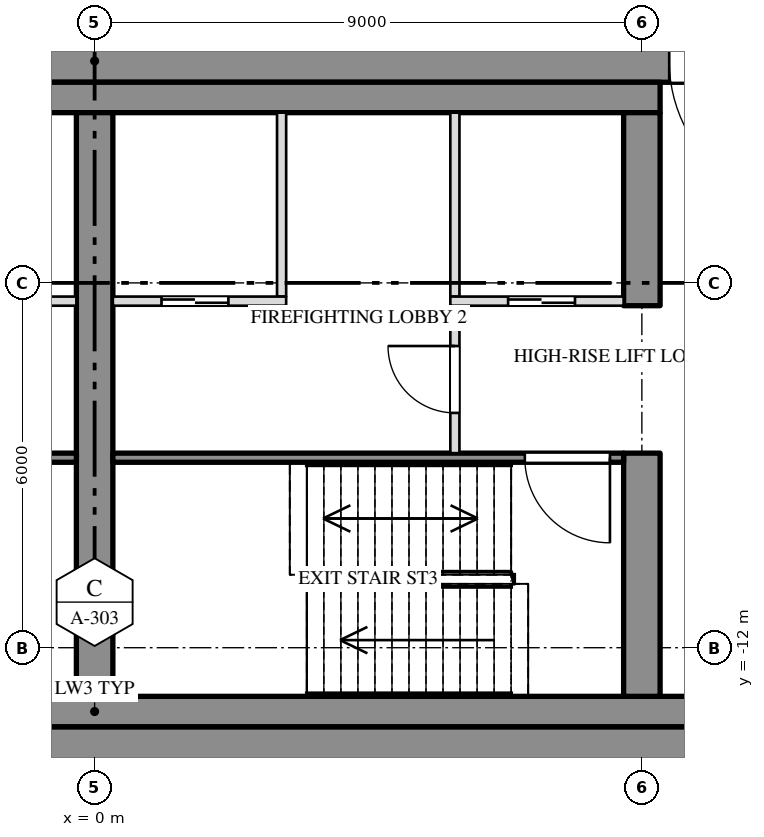
"""IFC4 building model, lengths in metres.
Left out: names, types, materials, properties, quantities, classifications, styles, units other than length and angle.
Written with IfcOpenShell. Run it as: python <this file> out.ifc"""

import sys

from ifc_helpers import new_model, si_unit, direction, frame, frame_2d, origin, place, context, subcontext, project, spatial, rectangle, extrude, element, fill, save


model = new_model("IFC4")
c1 = context("Model", 3, precision=1e-05, world=origin(), true_north=direction((0.0, 1.0)))
c2 = subcontext(c1, "Body", "Model", "MODEL_VIEW")
j1 = project(units=[si_unit("LENGTHUNIT", "METRE"), si_unit("PLANEANGLEUNIT", "RADIAN")], contexts=[c1])
p1 = place(None, origin())
s1 = spatial("IfcSite", under=j1, at=p1, CompositionType="ELEMENT")
p2 = place(p1, origin())
s2 = spatial("IfcBuilding", under=s1, at=p2, CompositionType="ELEMENT")
p3 = place(p2, frame((0.0, 0.0, 256.5)))
s3 = spatial("IfcBuildingStorey", under=s2, at=p3, CompositionType="ELEMENT", Elevation=256.5)
p4 = place(p3, frame((-27.0, -2.35, 0.0), z_axis=(0.0, 0.0, 1.0), x_axis=(1.0, 0.0, 0.0)))
e1 = element("IfcWall", 1, at=p4, inside=s3, PredefinedType="SHEAR", context=c2, shape_type="SweptSolid", body=[
    extrude(rectangle(XDim=54.0, YDim=0.7, at=frame_2d((27.0, 0.0))), origin(), (0.0, 0.0, 1.0), 3.8),
])
p5 = place(p4, frame((15.15, 0.0, 0.0)))
e2 = element("IfcOpeningElement", 2, at=p5, cuts=e1, PredefinedType="OPENING", context=c2, shape_type="SweptSolid", body=[
    extrude(rectangle(XDim=2.4, YDim=2.1, at=frame_2d((1.2, 1.05))), frame((0.0, 0.362, 0.0), z_axis=(0.0, -1.0, 0.0), x_axis=(1.0, 0.0, 0.0)), (0.0, 0.0, 1.0), 0.724),
])
p6 = place(p4, frame((36.45, 0.0, 0.0)))
e3 = element("IfcOpeningElement", 3, at=p6, cuts=e1, PredefinedType="OPENING", context=c2, shape_type="SweptSolid", body=[
    extrude(rectangle(XDim=2.4, YDim=2.1, at=frame_2d((1.2, 1.05))), frame((0.0, 0.362, 0.0), z_axis=(0.0, -1.0, 0.0), x_axis=(1.0, 0.0, 0.0)), (0.0, 0.0, 1.0), 0.724),
])
p7 = place(p3, frame((-27.0, -13.65, 0.0), z_axis=(0.0, 0.0, 1.0), x_axis=(1.0, 0.0, 0.0)))
e4 = element("IfcWall", 4, at=p7, inside=s3, PredefinedType="SHEAR", context=c2, shape_type="SweptSolid", body=[
    extrude(rectangle(XDim=54.0, YDim=0.7, at=frame_2d((27.0, 0.0))), origin(), (0.0, 0.0, 1.0), 3.8),
])
p8 = place(p3, frame((-9.3, -2.95, 0.0), z_axis=(0.0, 0.0, 1.0), x_axis=(1.0, 0.0, 0.0)))
e5 = element("IfcWall", 5, at=p8, inside=s3, PredefinedType="SHEAR", context=c2, shape_type="SweptSolid", body=[
    extrude(rectangle(XDim=18.6, YDim=0.5, at=frame_2d((9.3, 0.0))), origin(), (0.0, 0.0, 1.0), 3.8),
])
p9 = place(p3, frame((-26.3, -13.05, 0.0), z_axis=(0.0, 0.0, 1.0), x_axis=(1.0, 0.0, 0.0)))
e6 = element("IfcWall", 6, at=p9, inside=s3, PredefinedType="SHEAR", context=c2, shape_type="SweptSolid", body=[
    extrude(rectangle(XDim=52.6, YDim=0.5, at=frame_2d((26.3, 0.0))), origin(), (0.0, 0.0, 1.0), 3.8),
])
p10 = place(p3, frame((0.0, -12.8, 0.0), z_axis=(0.0, 0.0, 1.0), x_axis=(0.0, 1.0, 0.0)))
e7 = element("IfcWall", 7, at=p10, inside=s3, PredefinedType="SHEAR", context=c2, shape_type="SweptSolid", body=[
    extrude(rectangle(XDim=9.6, YDim=0.6, at=frame_2d((4.8, 0.0))), origin(), (0.0, 0.0, 1.0), 3.8),
])
p11 = place(p3, frame((9.0, -12.8, 0.0), z_axis=(0.0, 0.0, 1.0), x_axis=(0.0, 1.0, 0.0)))
e8 = element("IfcWall", 8, at=p11, inside=s3, PredefinedType="SHEAR", context=c2, shape_type="SweptSolid", body=[
    extrude(rectangle(XDim=4.0, YDim=0.6, at=frame_2d((2.0, 0.0))), origin(), (0.0, 0.0, 1.0), 3.8),
])
p12 = place(p3, frame((9.0, -6.375, 0.0), z_axis=(0.0, 0.0, 1.0), x_axis=(0.0, 1.0, 0.0)))
e9 = element("IfcWall", 9, at=p12, inside=s3, PredefinedType="SHEAR", context=c2, shape_type="SweptSolid", body=[
    extrude(rectangle(XDim=3.175, YDim=0.6, at=frame_2d((1.587, 0.0))), origin(), (0.0, 0.0, 1.0), 3.8),
])
for number, where, z_axis, x_axis in (
    (10, (3.075, -6.225, 0.0), (0.0, 0.0, 1.0), (0.0, 1.0, 0.0)),
    (11, (5.925, -6.225, 0.0), (0.0, 0.0, 1.0), (0.0, 1.0, 0.0)),
):
    element("IfcWall", number, at=place(p3, frame(where, z_axis=z_axis, x_axis=x_axis)), inside=s3, PredefinedType="PARTITIONING", context=c2, shape_type="SweptSolid", body=[
        extrude(rectangle(XDim=3.025, YDim=0.15, at=frame_2d((1.513, 0.0))), origin(), (0.0, 0.0, 1.0), 3.8),
    ])
p13 = place(p3, frame((5.925, -8.8, 0.0), z_axis=(0.0, 0.0, 1.0), x_axis=(0.0, 1.0, 0.0)))
e12 = element("IfcWall", 12, at=p13, inside=s3, PredefinedType="PARTITIONING", context=c2, shape_type="SweptSolid", body=[
    extrude(rectangle(XDim=2.425, YDim=0.15, at=frame_2d((1.212, 0.0))), origin(), (0.0, 0.0, 1.0), 3.8),
])
p14 = place(p13, frame((0.662, 0.0, 0.0)))
e13 = element("IfcOpeningElement", 13, at=p14, cuts=e12, PredefinedType="OPENING", context=c2, shape_type="SweptSolid", body=[
    extrude(rectangle(XDim=1.1, YDim=2.1, at=frame_2d((0.55, 1.05))), frame((0.0, 0.087, 0.0), z_axis=(0.0, -1.0, 0.0), x_axis=(1.0, 0.0, 0.0)), (0.0, 0.0, 1.0), 0.174),
])
p15 = place(p3, frame((-3.15, -6.3, 0.0), z_axis=(0.0, 0.0, 1.0), x_axis=(1.0, 0.0, 0.0)))
e14 = element("IfcWall", 14, at=p15, inside=s3, PredefinedType="PARTITIONING", context=c2, shape_type="SweptSolid", body=[
    extrude(rectangle(XDim=2.85, YDim=0.15, at=frame_2d((1.425, 0.0))), origin(), (0.0, 0.0, 1.0), 3.8),
])
p16 = place(p15, frame((0.95, 0.0, 0.0)))
e15 = element("IfcOpeningElement", 15, at=p16, cuts=e14, PredefinedType="OPENING", context=c2, shape_type="SweptSolid", body=[
    extrude(rectangle(XDim=1.1, YDim=2.1, at=frame_2d((0.55, 1.05))), frame((0.0, 0.087, 0.0), z_axis=(0.0, -1.0, 0.0), x_axis=(1.0, 0.0, 0.0)), (0.0, 0.0, 1.0), 0.174),
])
p17 = place(p3, frame((0.3, -6.3, 0.0), z_axis=(0.0, 0.0, 1.0), x_axis=(1.0, 0.0, 0.0)))
e16 = element("IfcWall", 16, at=p17, inside=s3, PredefinedType="PARTITIONING", context=c2, shape_type="SweptSolid", body=[
    extrude(rectangle(XDim=2.85, YDim=0.15, at=frame_2d((1.425, 0.0))), origin(), (0.0, 0.0, 1.0), 3.8),
])
p18 = place(p17, frame((0.8, 0.0, 0.0)))
e17 = element("IfcOpeningElement", 17, at=p18, cuts=e16, PredefinedType="OPENING", context=c2, shape_type="SweptSolid", body=[
    extrude(rectangle(XDim=1.1, YDim=2.1, at=frame_2d((0.55, 1.05))), frame((0.0, 0.087, 0.0), z_axis=(0.0, -1.0, 0.0), x_axis=(1.0, 0.0, 0.0)), (0.0, 0.0, 1.0), 0.174),
])
p19 = place(p3, frame((5.85, -6.3, 0.0), z_axis=(0.0, 0.0, 1.0), x_axis=(1.0, 0.0, 0.0)))
e18 = element("IfcWall", 18, at=p19, inside=s3, PredefinedType="PARTITIONING", context=c2, shape_type="SweptSolid", body=[
    extrude(rectangle(XDim=2.85, YDim=0.15, at=frame_2d((1.425, 0.0))), origin(), (0.0, 0.0, 1.0), 3.8),
])
p20 = place(p19, frame((0.95, 0.0, 0.0)))
e19 = element("IfcOpeningElement", 19, at=p20, cuts=e18, PredefinedType="OPENING", context=c2, shape_type="SweptSolid", body=[
    extrude(rectangle(XDim=1.1, YDim=2.1, at=frame_2d((0.55, 1.05))), frame((0.0, 0.087, 0.0), z_axis=(0.0, -1.0, 0.0), x_axis=(1.0, 0.0, 0.0)), (0.0, 0.0, 1.0), 0.174),
])
p21 = place(p3, frame((-8.7, -8.875, 0.0), z_axis=(0.0, 0.0, 1.0), x_axis=(1.0, 0.0, 0.0)))
e20 = element("IfcWall", 20, at=p21, inside=s3, PredefinedType="SHEAR", context=c2, shape_type="SweptSolid", body=[
    extrude(rectangle(XDim=8.4, YDim=0.15, at=frame_2d((4.2, 0.0))), origin(), (0.0, 0.0, 1.0), 3.8),
])
p22 = place(p21, frame((0.225, 0.0, 0.0)))
e21 = element("IfcOpeningElement", 21, at=p22, cuts=e20, PredefinedType="OPENING", context=c2, shape_type="SweptSolid", body=[
    extrude(rectangle(XDim=1.4, YDim=2.1, at=frame_2d((0.7, 1.05))), frame((0.0, 0.087, 0.0), z_axis=(0.0, -1.0, 0.0), x_axis=(1.0, 0.0, 0.0)), (0.0, 0.0, 1.0), 0.174),
])
p23 = place(p3, frame((0.3, -8.875, 0.0), z_axis=(0.0, 0.0, 1.0), x_axis=(1.0, 0.0, 0.0)))
e22 = element("IfcWall", 22, at=p23, inside=s3, PredefinedType="SHEAR", context=c2, shape_type="SweptSolid", body=[
    extrude(rectangle(XDim=8.4, YDim=0.15, at=frame_2d((4.2, 0.0))), origin(), (0.0, 0.0, 1.0), 3.8),
])
p24 = place(p23, frame((6.775, 0.0, 0.0)))
e23 = element("IfcOpeningElement", 23, at=p24, cuts=e22, PredefinedType="OPENING", context=c2, shape_type="SweptSolid", body=[
    extrude(rectangle(XDim=1.4, YDim=2.1, at=frame_2d((0.7, 1.05))), frame((0.0, 0.087, 0.0), z_axis=(0.0, -1.0, 0.0), x_axis=(1.0, 0.0, 0.0)), (0.0, 0.0, 1.0), 0.174),
])
p25 = place(p18, origin())
e24 = element("IfcDoor", 24, at=p25, inside=s3, OperationType="SLIDING_TO_RIGHT", PredefinedType="DOOR", context=c2, shape_type="SweptSolid", body=[
    extrude(rectangle(XDim=1.1, YDim=2.1, at=frame_2d((0.55, 1.05))), frame((0.0, 0.025, 0.0), z_axis=(0.0, -1.0, 0.0), x_axis=(1.0, 0.0, 0.0)), (0.0, 0.0, 1.0), 0.05),
])
fill(e17, e24)
p26 = place(p14, origin())
e25 = element("IfcDoor", 25, at=p26, inside=s3, OperationType="SINGLE_SWING_RIGHT", PredefinedType="DOOR", context=c2, shape_type="SweptSolid", body=[
    extrude(rectangle(XDim=1.1, YDim=2.1, at=frame_2d((0.55, 1.05))), frame((0.0, 0.025, 0.0), z_axis=(0.0, -1.0, 0.0), x_axis=(1.0, 0.0, 0.0)), (0.0, 0.0, 1.0), 0.05),
])
fill(e13, e25)
p27 = place(p20, origin())
e26 = element("IfcDoor", 26, at=p27, inside=s3, OperationType="SLIDING_TO_RIGHT", PredefinedType="DOOR", context=c2, shape_type="SweptSolid", body=[
    extrude(rectangle(XDim=1.1, YDim=2.1, at=frame_2d((0.55, 1.05))), frame((0.0, 0.025, 0.0), z_axis=(0.0, -1.0, 0.0), x_axis=(1.0, 0.0, 0.0)), (0.0, 0.0, 1.0), 0.05),
])
fill(e19, e26)
p28 = place(p24, origin())
e27 = element("IfcDoor", 27, at=p28, inside=s3, OperationType="DOUBLE_DOOR_SINGLE_SWING", PredefinedType="DOOR", context=c2, shape_type="SweptSolid", body=[
    extrude(rectangle(XDim=1.4, YDim=2.1, at=frame_2d((0.7, 1.05))), frame((0.0, 0.025, 0.0), z_axis=(0.0, -1.0, 0.0), x_axis=(1.0, 0.0, 0.0)), (0.0, 0.0, 1.0), 0.05),
])
fill(e23, e27)
p29 = place(p6, origin())
e28 = element("IfcDoor", 28, at=p29, inside=s3, OperationType="DOUBLE_DOOR_SINGLE_SWING", PredefinedType="DOOR", context=c2, shape_type="SweptSolid", body=[
    extrude(rectangle(XDim=2.4, YDim=2.1, at=frame_2d((1.2, 1.05))), frame((0.0, 0.025, 0.0), z_axis=(0.0, -1.0, 0.0), x_axis=(1.0, 0.0, 0.0)), (0.0, 0.0, 1.0), 0.05),
])
fill(e3, e28)
save(model, sys.argv[1])
